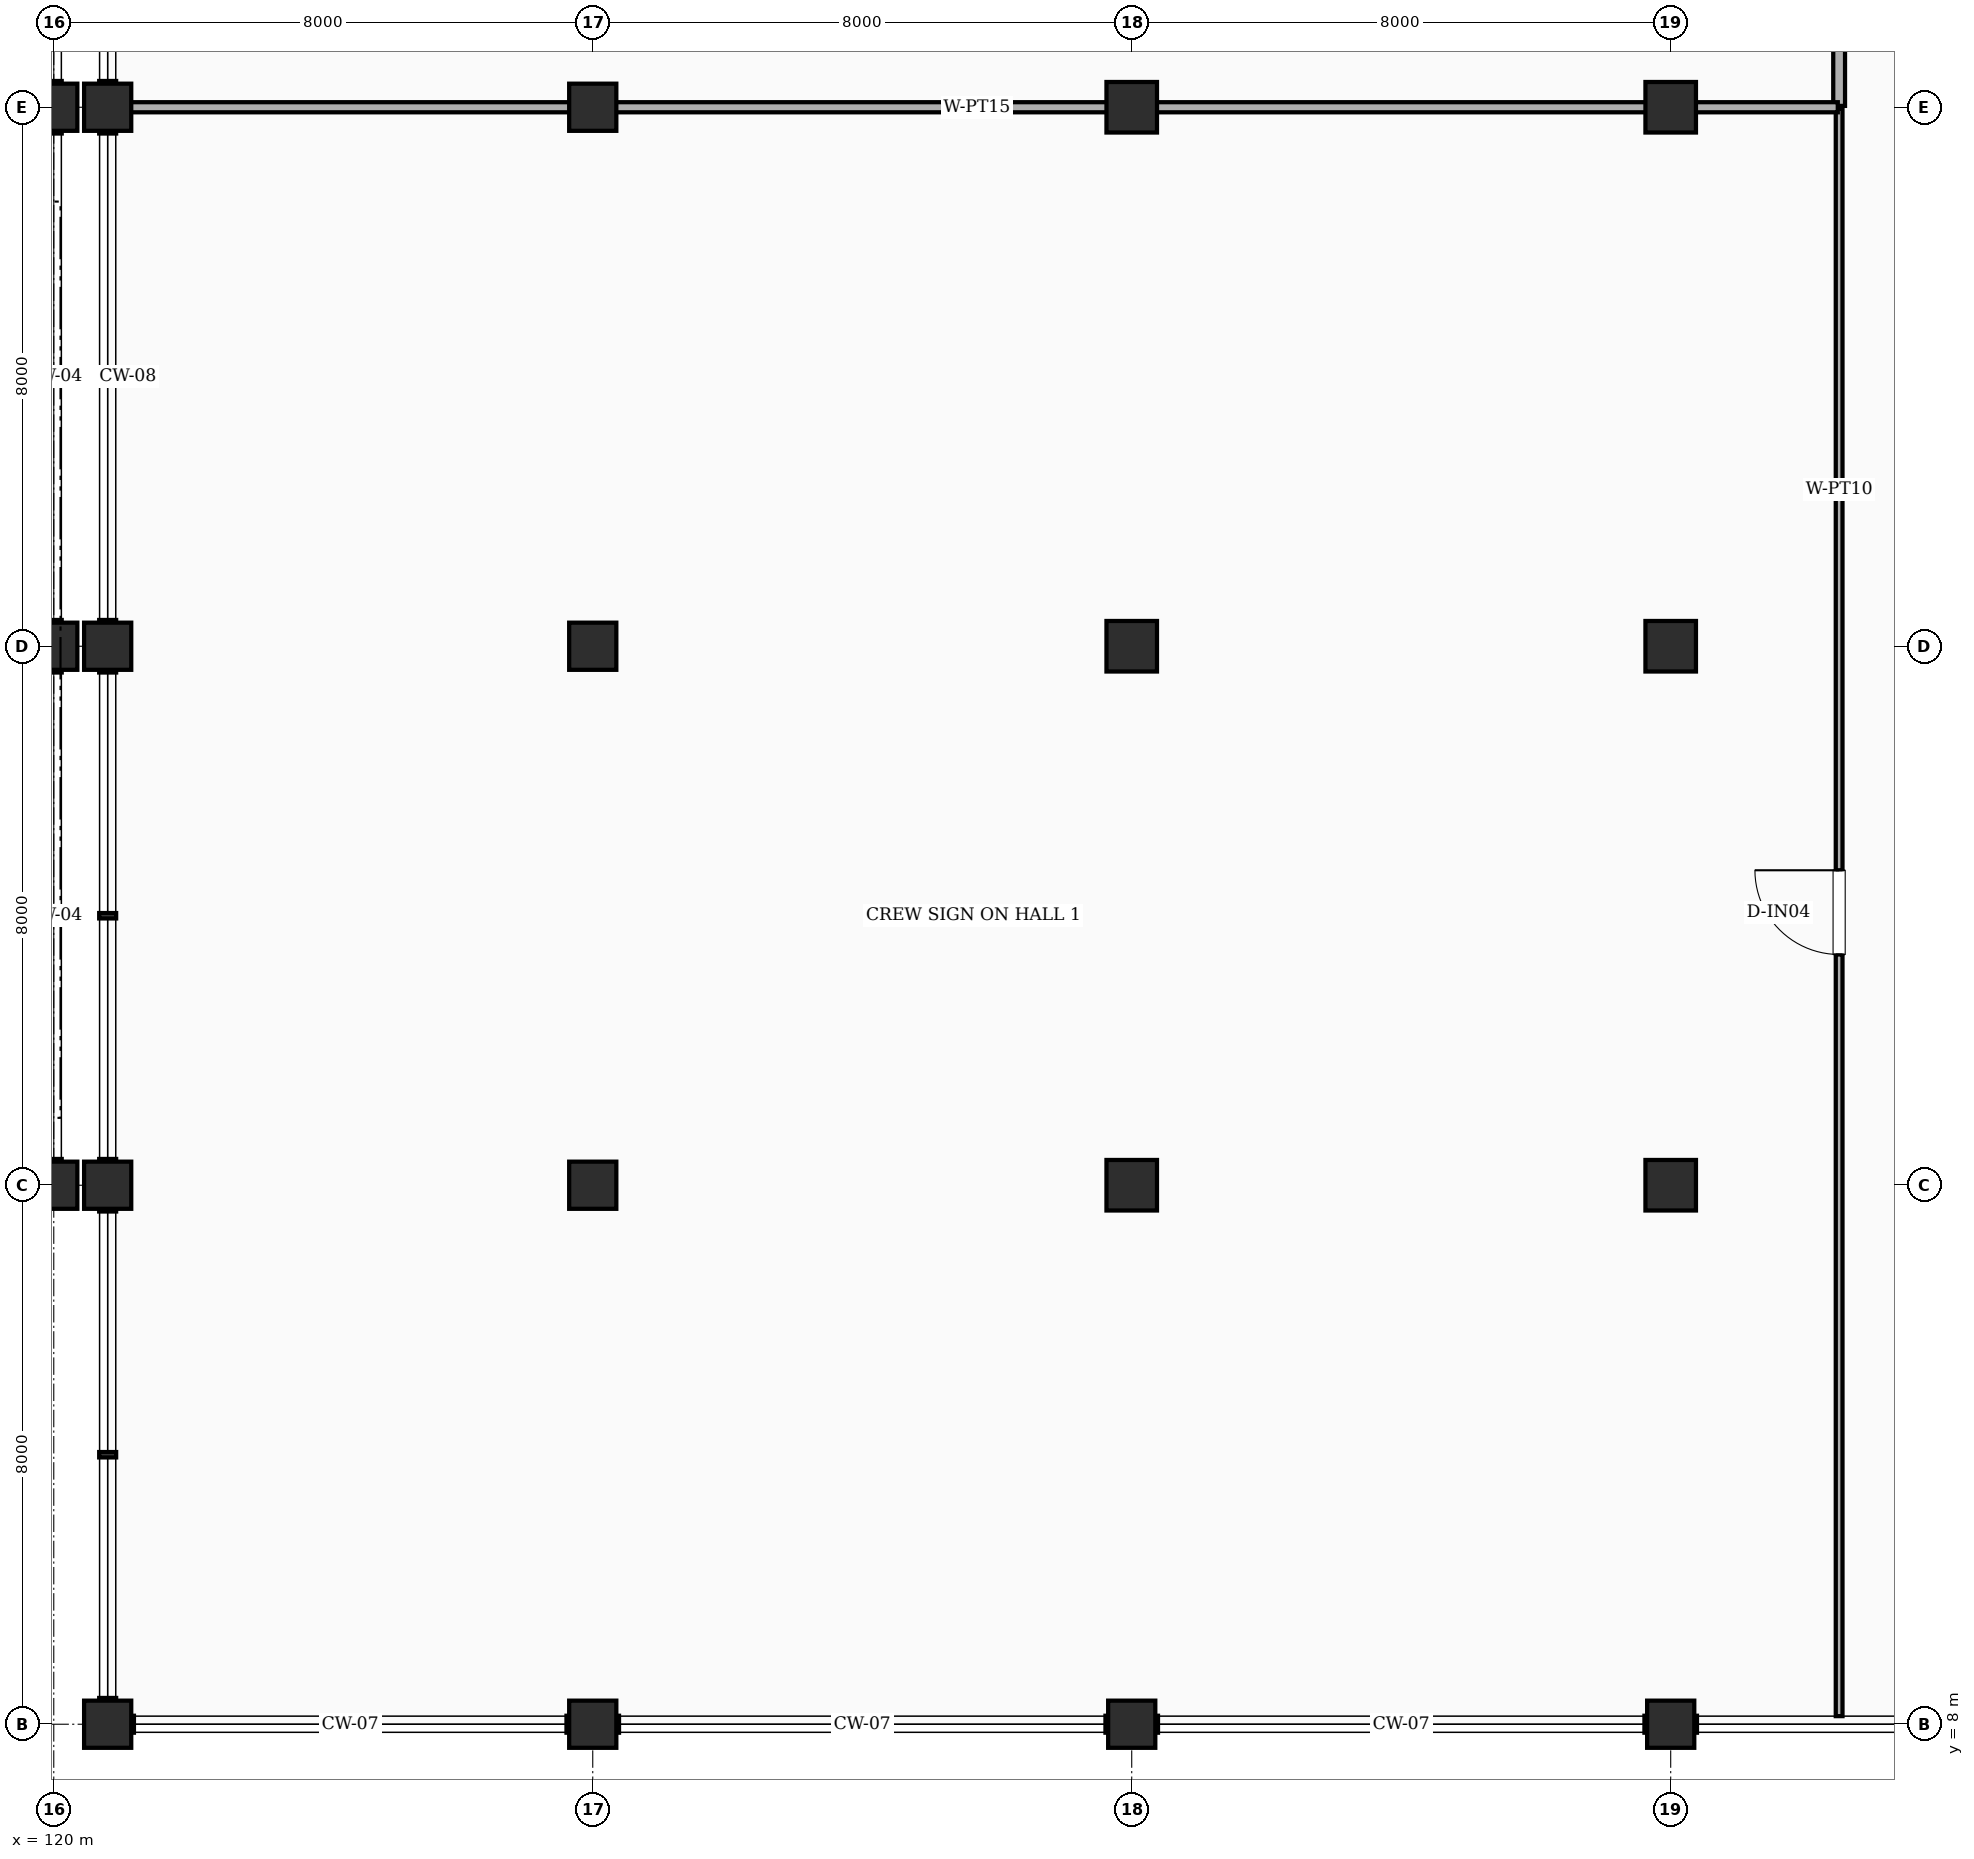
"""IFC4 building model, lengths in metres.
Left out: names, types, materials, properties, quantities, classifications, styles, units other than length and angle.
Written with IfcOpenShell. Run it as: python <this file> out.ifc"""

import sys

from ifc_helpers import new_model, si_unit, direction, frame, frame_2d, origin, origin_2d, place, context, subcontext, project, spatial, rectangle, extrude, element, fill, save


model = new_model("IFC4")
c1 = context("Model", 3, precision=1e-05, world=origin(), true_north=direction((0.0, 1.0)))
c2 = subcontext(c1, "Body", "Model", "MODEL_VIEW")
j1 = project(units=[si_unit("LENGTHUNIT", "METRE"), si_unit("PLANEANGLEUNIT", "RADIAN")], contexts=[c1])
p1 = place(None, origin())
s1 = spatial("IfcSite", under=j1, at=p1, CompositionType="ELEMENT")
p2 = place(p1, origin())
s2 = spatial("IfcBuilding", under=s1, at=p2, CompositionType="ELEMENT")
p3 = place(p2, frame((0.0, 0.0, 5.4)))
s3 = spatial("IfcBuildingStorey", under=s2, at=p3, CompositionType="ELEMENT", Elevation=5.4)
for number, where, z_axis, x_axis in (
    (1, (120.0, 16.0, 0.0), (0.0, 0.0, 1.0), (1.0, 0.0, 0.0)),
    (2, (120.0, 24.0, 0.0), (0.0, 0.0, 1.0), (1.0, 0.0, 0.0)),
    (3, (120.0, 32.0, 0.0), (0.0, 0.0, 1.0), (1.0, 0.0, 0.0)),
    (4, (120.8, 8.0, 0.0), (0.0, 0.0, 1.0), (1.0, 0.0, 0.0)),
    (5, (120.8, 16.0, 0.0), (0.0, 0.0, 1.0), (1.0, 0.0, 0.0)),
    (6, (120.8, 24.0, 0.0), (0.0, 0.0, 1.0), (1.0, 0.0, 0.0)),
    (7, (120.8, 32.0, 0.0), (0.0, 0.0, 1.0), (1.0, 0.0, 0.0)),
    (8, (128.0, 8.0, 0.0), (0.0, 0.0, 1.0), (1.0, 0.0, 0.0)),
    (9, (128.0, 16.0, 0.0), (0.0, 0.0, 1.0), (1.0, 0.0, 0.0)),
    (10, (128.0, 24.0, 0.0), (0.0, 0.0, 1.0), (1.0, 0.0, 0.0)),
    (11, (128.0, 32.0, 0.0), (0.0, 0.0, 1.0), (1.0, 0.0, 0.0)),
    (12, (136.0, 8.0, 0.0), (0.0, 0.0, 1.0), (1.0, 0.0, 0.0)),
):
    element("IfcColumn", number, at=place(p3, frame(where, z_axis=z_axis, x_axis=x_axis)), inside=s3, PredefinedType="COLUMN", context=c2, shape_type="SweptSolid", body=[
        extrude(rectangle(XDim=0.7, YDim=0.7, at=origin_2d()), origin(), (0.0, 0.0, 1.0), 5.4),
    ])
for number, where, z_axis, x_axis in (
    (13, (136.0, 16.0, 0.0), (0.0, 0.0, 1.0), (1.0, 0.0, 0.0)),
    (14, (136.0, 24.0, 0.0), (0.0, 0.0, 1.0), (1.0, 0.0, 0.0)),
    (15, (136.0, 32.0, 0.0), (0.0, 0.0, 1.0), (1.0, 0.0, 0.0)),
):
    element("IfcColumn", number, at=place(p3, frame(where, z_axis=z_axis, x_axis=x_axis)), inside=s3, PredefinedType="COLUMN", context=c2, shape_type="SweptSolid", body=[
        extrude(rectangle(XDim=0.75, YDim=0.75, at=origin_2d()), origin(), (0.0, 0.0, 1.0), 5.4),
    ])
p4 = place(p3, frame((144.0, 8.0, 0.0), z_axis=(0.0, 0.0, 1.0), x_axis=(1.0, 0.0, 0.0)))
e16 = element("IfcColumn", 16, at=p4, inside=s3, PredefinedType="COLUMN", context=c2, shape_type="SweptSolid", body=[
    extrude(rectangle(XDim=0.7, YDim=0.7, at=origin_2d()), origin(), (0.0, 0.0, 1.0), 5.4),
])
for number, where, z_axis, x_axis in (
    (17, (144.0, 16.0, 0.0), (0.0, 0.0, 1.0), (1.0, 0.0, 0.0)),
    (18, (144.0, 24.0, 0.0), (0.0, 0.0, 1.0), (1.0, 0.0, 0.0)),
    (19, (144.0, 32.0, 0.0), (0.0, 0.0, 1.0), (1.0, 0.0, 0.0)),
):
    element("IfcColumn", number, at=place(p3, frame(where, z_axis=z_axis, x_axis=x_axis)), inside=s3, PredefinedType="COLUMN", context=c2, shape_type="SweptSolid", body=[
        extrude(rectangle(XDim=0.75, YDim=0.75, at=origin_2d()), origin(), (0.0, 0.0, 1.0), 5.4),
    ])
p5 = place(p3, frame((146.5, 8.12, 0.0), z_axis=(0.0, 0.0, 1.0), x_axis=(0.0, 1.0, 0.0)))
e20 = element("IfcWall", 20, at=p5, inside=s3, PredefinedType="PARTITIONING", context=c2, shape_type="SweptSolid", body=[
    extrude(rectangle(XDim=23.86, YDim=0.1, at=frame_2d((11.93, 0.0))), origin(), (0.0, 0.0, 1.0), 5.12),
])
p6 = place(p5, frame((11.305, 0.0, 0.0)))
e21 = element("IfcOpeningElement", 21, at=p6, cuts=e20, PredefinedType="OPENING", context=c2, shape_type="SweptSolid", body=[
    extrude(rectangle(XDim=1.25, YDim=2.15, at=frame_2d((0.625, 1.075))), frame((0.0, 0.06, 0.0), z_axis=(0.0, -1.0, 0.0), x_axis=(1.0, 0.0, 0.0)), (0.0, 0.0, 1.0), 0.12),
])
p7 = place(p3, frame((146.5, 32.02, 0.0), z_axis=(0.0, 0.0, 1.0), x_axis=(0.0, 1.0, 0.0)))
e22 = element("IfcWall", 22, at=p7, inside=s3, PredefinedType="PARTITIONING", context=c2, shape_type="SweptSolid", body=[
    extrude(rectangle(XDim=17.96, YDim=0.175, at=frame_2d((8.98, 0.0))), origin(), (0.0, 0.0, 1.0), 5.12),
])
p8 = place(p7, frame((8.44, 0.0, 0.0)))
e23 = element("IfcOpeningElement", 23, at=p8, cuts=e22, PredefinedType="OPENING", context=c2, shape_type="SweptSolid", body=[
    extrude(rectangle(XDim=1.08, YDim=2.15, at=frame_2d((0.54, 1.075))), frame((0.0, 0.097, 0.0), z_axis=(0.0, -1.0, 0.0), x_axis=(1.0, 0.0, 0.0)), (0.0, 0.0, 1.0), 0.195),
])
p9 = place(p3, frame((120.92, 32.0, 0.0), z_axis=(0.0, 0.0, 1.0), x_axis=(1.0, 0.0, 0.0)))
e24 = element("IfcWall", 24, at=p9, inside=s3, PredefinedType="PARTITIONING", context=c2, shape_type="SweptSolid", body=[
    extrude(rectangle(XDim=25.56, YDim=0.15, at=frame_2d((12.78, 0.0))), origin(), (0.0, 0.0, 1.0), 4.39),
])
p10 = place(p6, origin())
e25 = element("IfcDoor", 25, at=p10, inside=s3, OperationType="SINGLE_SWING_RIGHT", PredefinedType="DOOR", context=c2, shape_type="SweptSolid", body=[
    extrude(rectangle(XDim=1.25, YDim=2.15, at=frame_2d((0.625, 1.075))), frame((0.0, 0.025, 0.0), z_axis=(0.0, -1.0, 0.0), x_axis=(1.0, 0.0, 0.0)), (0.0, 0.0, 1.0), 0.05),
])
fill(e21, e25)
save(model, sys.argv[1])
